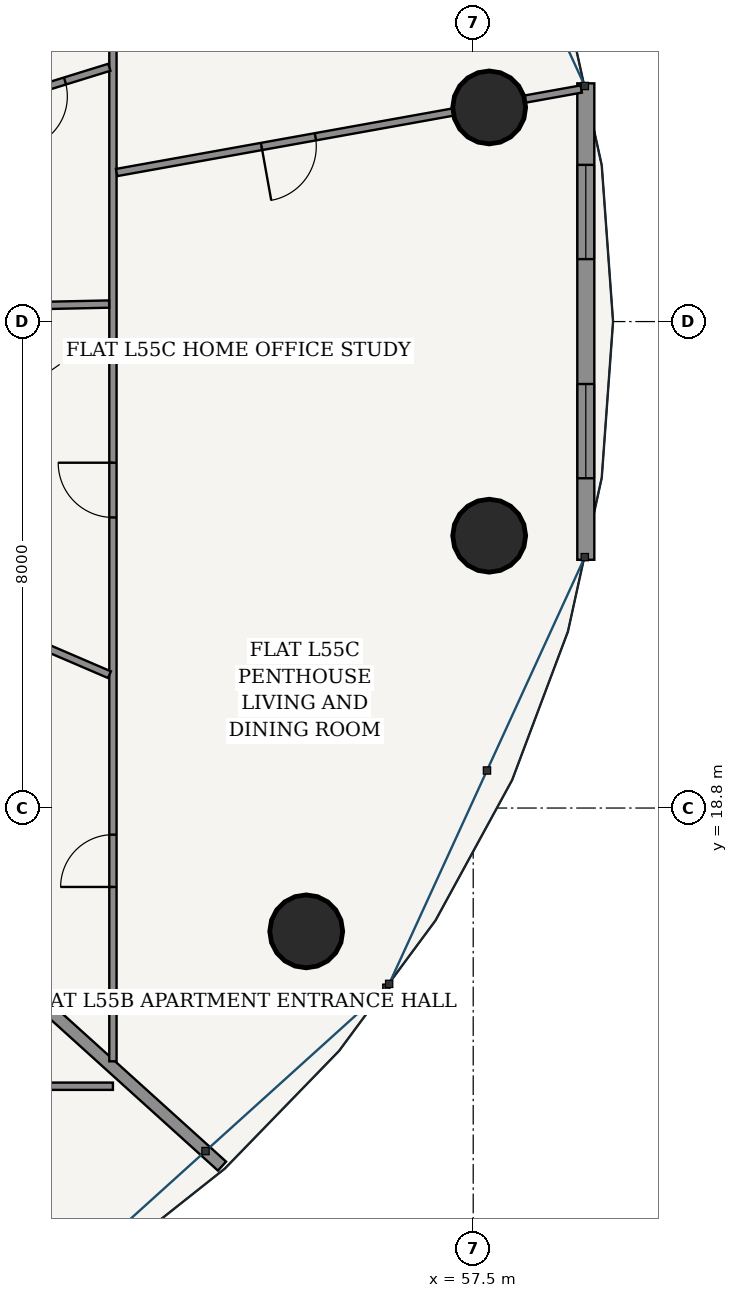
"""IFC4 building model, lengths in metres.
Left out: names, types, materials, properties, quantities, classifications, styles, units other than length and angle.
Written with IfcOpenShell. Run it as: python <this file> out.ifc"""

import sys

from ifc_helpers import new_model, si_unit, direction, frame, frame_2d, origin, origin_2d, place, context, subcontext, project, spatial, rectangle, hollow_circle, extrude, source, transform, mapped, element, fill, save


model = new_model("IFC4")
c1 = context("Model", 3, precision=1e-05, world=origin(), true_north=direction((-0.2419218956, 0.970295726276)))
c2 = subcontext(c1, "Body", "Model", "MODEL_VIEW")
j1 = project(units=[si_unit("LENGTHUNIT", "METRE"), si_unit("PLANEANGLEUNIT", "RADIAN")], contexts=[c1])
p1 = place(None, origin())
s1 = spatial("IfcSite", under=j1, at=p1, CompositionType="ELEMENT")
p2 = place(p1, origin())
s2 = spatial("IfcBuilding", under=s1, at=p2, CompositionType="ELEMENT")
p3 = place(p2, frame((0.0, 0.0, 209.7)))
s3 = spatial("IfcBuildingStorey", under=s2, at=p3, CompositionType="ELEMENT", Elevation=209.7)
for number, where, z_axis, x_axis in (
    (1, (57.763, 30.321, 0.0), (0.0, 0.0, 1.0), (1.0, 0.0, 0.0)),
    (2, (54.754, 16.772, 0.0), (0.0, 0.0, 1.0), (1.0, 0.0, 0.0)),
    (3, (57.763, 23.279, 0.0), (0.0, 0.0, 1.0), (1.0, 0.0, 0.0)),
):
    element("IfcColumn", number, at=place(p3, frame(where, z_axis=z_axis, x_axis=x_axis)), inside=s3, PredefinedType="COLUMN", context=c2, shape_type="SweptSolid", body=[
        extrude(hollow_circle(Radius=0.6, WallThickness=0.038, at=origin_2d()), origin(), (0.0, 0.0, 1.0), 3.7),
    ])
p4 = place(p3, frame((59.352, 22.883, 0.0), z_axis=(0.0, 0.0, 1.0), x_axis=(0.0, 1.0, 0.0)))
e4 = element("IfcWall", 4, at=p4, inside=s3, PredefinedType="SOLIDWALL", context=c2, shape_type="SweptSolid", body=[
    extrude(rectangle(XDim=7.835, YDim=0.28, at=frame_2d((3.917, 0.0))), origin(), (0.0, 0.0, 1.0), 3.435),
])
p5 = place(p4, frame((1.34, 0.0, 0.85)))
e5 = element("IfcOpeningElement", 5, at=p5, cuts=e4, PredefinedType="OPENING", context=c2, shape_type="SweptSolid", body=[
    extrude(rectangle(XDim=1.55, YDim=1.95, at=frame_2d((0.775, 0.975))), frame((0.0, 0.15, 0.0), z_axis=(0.0, -1.0, 0.0), x_axis=(1.0, 0.0, 0.0)), (0.0, 0.0, 1.0), 0.3),
])
p6 = place(p4, frame((4.944, 0.0, 0.85)))
e6 = element("IfcOpeningElement", 6, at=p6, cuts=e4, PredefinedType="OPENING", context=c2, shape_type="SweptSolid", body=[
    extrude(rectangle(XDim=1.55, YDim=1.95, at=frame_2d((0.775, 0.975))), frame((0.0, 0.15, 0.0), z_axis=(0.0, -1.0, 0.0), x_axis=(1.0, 0.0, 0.0)), (0.0, 0.0, 1.0), 0.3),
])
p7 = place(p3, frame((51.575, 14.225, 0.0), z_axis=(0.0, 0.0, 1.0), x_axis=(-1.0, 0.0, 0.0)))
e7 = element("IfcWall", 7, at=p7, inside=s3, PredefinedType="PARTITIONING", context=c2, shape_type="SweptSolid", body=[
    extrude(rectangle(XDim=19.675, YDim=0.12, at=frame_2d((9.837, 0.0))), origin(), (0.0, 0.0, 1.0), 2.951),
])
p8 = place(p7, frame((3.083, 0.0, 0.0)))
e8 = element("IfcOpeningElement", 8, at=p8, cuts=e7, PredefinedType="OPENING", context=c2, shape_type="SweptSolid", body=[
    extrude(rectangle(XDim=0.9, YDim=2.15, at=frame_2d((0.45, 1.075))), frame((0.0, 0.07, 0.0), z_axis=(0.0, -1.0, 0.0), x_axis=(1.0, 0.0, 0.0)), (0.0, 0.0, 1.0), 0.14),
])
p9 = place(p7, frame((12.063, 0.0, 0.0)))
e9 = element("IfcOpeningElement", 9, at=p9, cuts=e7, PredefinedType="OPENING", context=c2, shape_type="SweptSolid", body=[
    extrude(rectangle(XDim=0.9, YDim=2.15, at=frame_2d((0.45, 1.075))), frame((0.0, 0.07, 0.0), z_axis=(0.0, -1.0, 0.0), x_axis=(1.0, 0.0, 0.0)), (0.0, 0.0, 1.0), 0.14),
])
p10 = place(p7, frame((17.777, 0.0, 0.0)))
e10 = element("IfcOpeningElement", 10, at=p10, cuts=e7, PredefinedType="OPENING", context=c2, shape_type="SweptSolid", body=[
    extrude(rectangle(XDim=0.9, YDim=2.15, at=frame_2d((0.45, 1.075))), frame((0.0, 0.07, 0.0), z_axis=(0.0, -1.0, 0.0), x_axis=(1.0, 0.0, 0.0)), (0.0, 0.0, 1.0), 0.14),
])
p11 = place(p3, frame((49.235, 16.647, 0.0), z_axis=(0.0, 0.0, 1.0), x_axis=(0.741935290449, -0.670471494387, 0.0)))
e11 = element("IfcWall", 11, at=p11, inside=s3, PredefinedType="PARTITIONING", context=c2, shape_type="SweptSolid", body=[
    extrude(rectangle(XDim=5.572, YDim=0.2, at=frame_2d((2.786, 0.0))), origin(), (0.0, 0.0, 1.0), 2.951),
])
p12 = place(p3, frame((51.575, 37.525, 0.0), z_axis=(0.0, 0.0, 1.0), x_axis=(0.0, -1.0, 0.0)))
e12 = element("IfcWall", 12, at=p12, inside=s3, PredefinedType="PARTITIONING", context=c2, shape_type="SweptSolid", body=[
    extrude(rectangle(XDim=22.89, YDim=0.12, at=frame_2d((11.445, 0.0))), origin(), (0.0, 0.0, 1.0), 2.951),
])
p13 = place(p12, frame((4.102, 0.0, 0.0)))
e13 = element("IfcOpeningElement", 13, at=p13, cuts=e12, PredefinedType="OPENING", context=c2, shape_type="SweptSolid", body=[
    extrude(rectangle(XDim=0.9, YDim=2.15, at=frame_2d((0.45, 1.075))), frame((0.0, 0.07, 0.0), z_axis=(0.0, -1.0, 0.0), x_axis=(1.0, 0.0, 0.0)), (0.0, 0.0, 1.0), 0.14),
])
p14 = place(p12, frame((19.163, 0.0, 0.0)))
e14 = element("IfcOpeningElement", 14, at=p14, cuts=e12, PredefinedType="OPENING", context=c2, shape_type="SweptSolid", body=[
    extrude(rectangle(XDim=0.86, YDim=2.15, at=frame_2d((0.43, 1.075))), frame((0.0, 0.07, 0.0), z_axis=(0.0, -1.0, 0.0), x_axis=(1.0, 0.0, 0.0)), (0.0, 0.0, 1.0), 0.14),
])
p15 = place(p12, frame((13.046, 0.0, 0.0)))
e15 = element("IfcOpeningElement", 15, at=p15, cuts=e12, PredefinedType="OPENING", context=c2, shape_type="SweptSolid", body=[
    extrude(rectangle(XDim=0.9, YDim=2.15, at=frame_2d((0.45, 1.075))), frame((0.0, 0.07, 0.0), z_axis=(0.0, -1.0, 0.0), x_axis=(1.0, 0.0, 0.0)), (0.0, 0.0, 1.0), 0.14),
])
p16 = place(p3, frame((51.636, 29.251, 0.0), z_axis=(0.0, 0.0, 1.0), x_axis=(0.984223216243, 0.176931231294, 0.0)))
e16 = element("IfcWall", 16, at=p16, inside=s3, PredefinedType="PARTITIONING", context=c2, shape_type="SweptSolid", body=[
    extrude(rectangle(XDim=7.763, YDim=0.12, at=frame_2d((3.882, 0.0))), origin(), (0.0, 0.0, 1.0), 2.951),
])
p17 = place(p16, frame((2.421, 0.0, 0.0)))
e17 = element("IfcOpeningElement", 17, at=p17, cuts=e16, PredefinedType="OPENING", context=c2, shape_type="SweptSolid", body=[
    extrude(rectangle(XDim=0.9, YDim=2.15, at=frame_2d((0.45, 1.075))), frame((0.0, 0.07, 0.0), z_axis=(0.0, -1.0, 0.0), x_axis=(1.0, 0.0, 0.0)), (0.0, 0.0, 1.0), 0.14),
])
p18 = place(p3, frame((49.237, 21.973, 0.0), z_axis=(0.0, 0.0, 1.0), x_axis=(0.91880901308, -0.394702416364, 0.0)))
e18 = element("IfcWall", 18, at=p18, inside=s3, PredefinedType="PARTITIONING", context=c2, shape_type="SweptSolid", body=[
    extrude(rectangle(XDim=2.483, YDim=0.12, at=frame_2d((1.241, 0.0))), origin(), (0.0, 0.0, 1.0), 3.11),
])
p19 = place(p3, frame((49.237, 27.039, 0.0), z_axis=(0.0, 0.0, 1.0), x_axis=(0.999772223164, 0.021342487922, 0.0)))
e19 = element("IfcWall", 19, at=p19, inside=s3, PredefinedType="PARTITIONING", context=c2, shape_type="SweptSolid", body=[
    extrude(rectangle(XDim=2.276, YDim=0.12, at=frame_2d((1.138, 0.0))), origin(), (0.0, 0.0, 1.0), 3.435),
])
p20 = place(p3, frame((49.237, 30.277, 0.0), z_axis=(0.0, 0.0, 1.0), x_axis=(0.955326488692, 0.295552533406, 0.0)))
e20 = element("IfcWall", 20, at=p20, inside=s3, PredefinedType="PARTITIONING", context=c2, shape_type="SweptSolid", body=[
    extrude(rectangle(XDim=2.386, YDim=0.12, at=frame_2d((1.193, 0.0))), origin(), (0.0, 0.0, 1.0), 3.435),
])
p21 = place(p20, frame((0.763, 0.0, 0.0)))
e21 = element("IfcOpeningElement", 21, at=p21, cuts=e20, PredefinedType="OPENING", context=c2, shape_type="SweptSolid", body=[
    extrude(rectangle(XDim=0.86, YDim=2.15, at=frame_2d((0.43, 1.075))), frame((0.0, 0.07, 0.0), z_axis=(0.0, -1.0, 0.0), x_axis=(1.0, 0.0, 0.0)), (0.0, 0.0, 1.0), 0.14),
])
m1 = source(origin(), c2, "Body", "SweptSolid", [
    extrude(rectangle(XDim=1.55, YDim=1.95, at=frame_2d((0.775, 0.975))), frame((0.0, 0.03, 0.0), z_axis=(0.0, -1.0, 0.0), x_axis=(1.0, 0.0, 0.0)), (0.0, 0.0, 1.0), 0.06),
])
p22 = place(p5, origin())
e22 = element("IfcWindow", 22, at=p22, inside=s3, PartitioningType="SINGLE_PANEL", PredefinedType="WINDOW", context=c2, shape_type="MappedRepresentation", body=[
    mapped(m1, transform((0.0, 0.0, 0.0), scale=1.0)),
])
fill(e5, e22)
p23 = place(p6, origin())
e23 = element("IfcWindow", 23, at=p23, inside=s3, PartitioningType="SINGLE_PANEL", PredefinedType="WINDOW", context=c2, shape_type="MappedRepresentation", body=[
    mapped(m1, transform((0.0, 0.0, 0.0), scale=1.0)),
])
fill(e6, e23)
m2 = source(origin(), c2, "Body", "SweptSolid", [
    extrude(rectangle(XDim=0.86, YDim=2.15, at=frame_2d((0.43, 1.075))), frame((0.0, 0.025, 0.0), z_axis=(0.0, -1.0, 0.0), x_axis=(1.0, 0.0, 0.0)), (0.0, 0.0, 1.0), 0.05),
])
p24 = place(p21, frame((0.86, 0.0, 0.0), z_axis=(0.0, 0.0, 1.0), x_axis=(-1.0, 0.0, 0.0)))
e24 = element("IfcDoor", 24, at=p24, inside=s3, OperationType="SINGLE_SWING_RIGHT", PredefinedType="DOOR", context=c2, shape_type="MappedRepresentation", body=[
    mapped(m2, transform((0.0, 0.0, 0.0), scale=1.0)),
])
fill(e21, e24)
m3 = source(origin(), c2, "Body", "SweptSolid", [
    extrude(rectangle(XDim=0.9, YDim=2.15, at=frame_2d((0.45, 1.075))), frame((0.0, 0.025, 0.0), z_axis=(0.0, -1.0, 0.0), x_axis=(1.0, 0.0, 0.0)), (0.0, 0.0, 1.0), 0.05),
])
p25 = place(p17, frame((0.9, 0.0, 0.0), z_axis=(0.0, 0.0, 1.0), x_axis=(-1.0, 0.0, 0.0)))
e25 = element("IfcDoor", 25, at=p25, inside=s3, OperationType="SINGLE_SWING_RIGHT", PredefinedType="DOOR", context=c2, shape_type="MappedRepresentation", body=[
    mapped(m3, transform((0.0, 0.0, 0.0), scale=1.0)),
])
fill(e17, e25)
p26 = place(p14, frame((0.86, 0.0, 0.0), z_axis=(0.0, 0.0, 1.0), x_axis=(-1.0, 0.0, 0.0)))
e26 = element("IfcDoor", 26, at=p26, inside=s3, OperationType="SINGLE_SWING_LEFT", PredefinedType="DOOR", context=c2, shape_type="MappedRepresentation", body=[
    mapped(m2, transform((0.0, 0.0, 0.0), scale=1.0)),
])
fill(e14, e26)
p27 = place(p15, frame((0.9, 0.0, 0.0), z_axis=(0.0, 0.0, 1.0), x_axis=(-1.0, 0.0, 0.0)))
e27 = element("IfcDoor", 27, at=p27, inside=s3, OperationType="SINGLE_SWING_RIGHT", PredefinedType="DOOR", context=c2, shape_type="MappedRepresentation", body=[
    mapped(m3, transform((0.0, 0.0, 0.0), scale=1.0)),
])
fill(e15, e27)
save(model, sys.argv[1])
